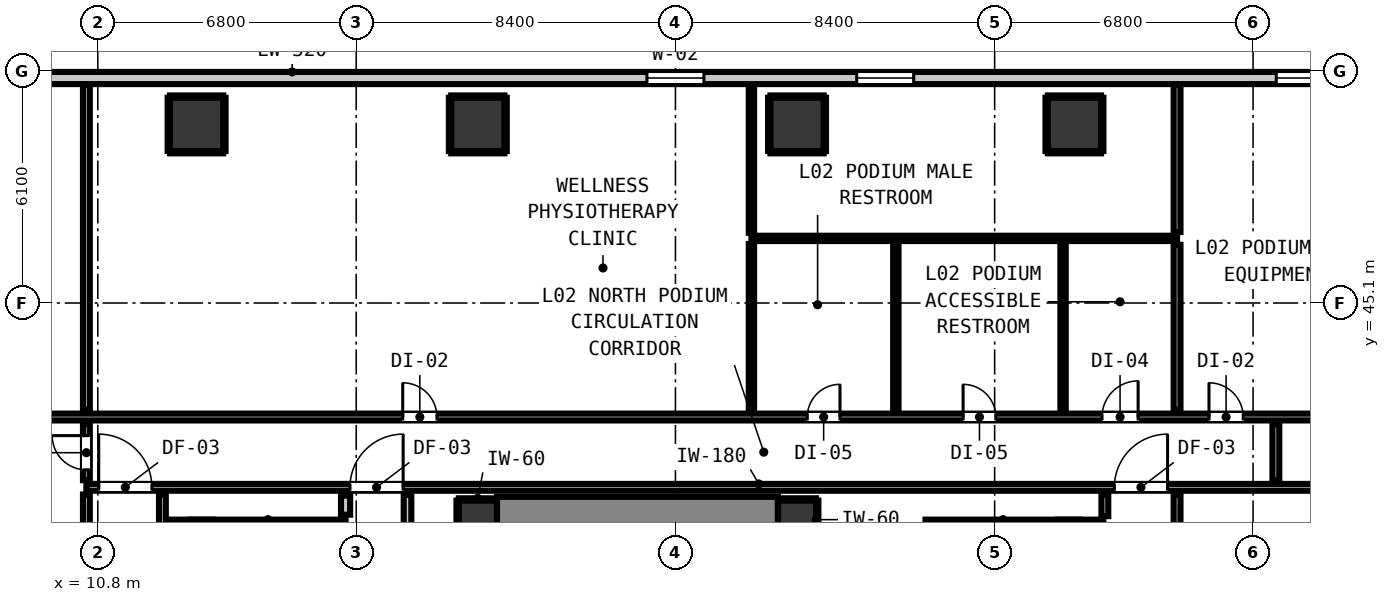
"""IFC4 building model, lengths in metres.
Left out: names, types, materials, properties, quantities, classifications, styles, units other than length and angle.
Written with IfcOpenShell. Run it as: python <this file> out.ifc"""

import sys

from ifc_helpers import new_model, si_unit, direction, frame, frame_2d, origin, origin_2d, place, context, subcontext, project, spatial, rectangle, extrude, element, fill, save


model = new_model("IFC4")
c1 = context("Model", 3, precision=1e-05, world=origin(), true_north=direction((0.0, 1.0)))
c2 = subcontext(c1, "Body", "Model", "MODEL_VIEW")
j1 = project(units=[si_unit("LENGTHUNIT", "METRE"), si_unit("PLANEANGLEUNIT", "RADIAN")], contexts=[c1])
p1 = place(None, origin())
s1 = spatial("IfcSite", under=j1, at=p1, CompositionType="ELEMENT")
p2 = place(p1, origin())
s2 = spatial("IfcBuilding", under=s1, at=p2, CompositionType="ELEMENT")
p3 = place(p2, frame((0.0, 0.0, 9.4)))
s3 = spatial("IfcBuildingStorey", under=s2, at=p3, CompositionType="ELEMENT", Elevation=9.4)
for number, where, z_axis, x_axis in (
    (1, (20.8, 39.4, 0.0), (0.0, 0.0, 1.0), (1.0, 0.0, 0.0)),
    (2, (29.2, 39.4, 0.0), (0.0, 0.0, 1.0), (1.0, 0.0, 0.0)),
):
    element("IfcColumn", number, at=place(p3, frame(where, z_axis=z_axis, x_axis=x_axis)), inside=s3, PredefinedType="COLUMN", context=c2, shape_type="SweptSolid", body=[
        extrude(rectangle(XDim=1.0, YDim=1.0, at=origin_2d()), origin(), (0.0, 0.0, 1.0), 4.2),
    ])
p4 = place(p3, frame((13.24, 31.205, 0.0), z_axis=(0.0, 0.0, 1.0), x_axis=(0.0, 1.0, 0.0)))
e3 = element("IfcWall", 3, at=p4, inside=s3, PredefinedType="SHEAR", context=c2, shape_type="SweptSolid", body=[
    extrude(rectangle(XDim=8.195, YDim=1.2, at=frame_2d((4.097, 0.0))), origin(), (0.0, 0.0, 1.0), 4.2),
])
p5 = place(p3, frame((13.24, 39.1, 0.0), z_axis=(0.0, 0.0, 1.0), x_axis=(1.0, 0.0, 0.0)))
e4 = element("IfcWall", 4, at=p5, inside=s3, PredefinedType="SHEAR", context=c2, shape_type="SweptSolid", body=[
    extrude(rectangle(XDim=4.08, YDim=0.6, at=frame_2d((2.04, 0.0))), origin(), (0.0, 0.0, 1.0), 4.2),
])
p6 = place(p3, frame((36.66, 31.205, 0.0), z_axis=(0.0, 0.0, 1.0), x_axis=(0.0, 1.0, 0.0)))
e5 = element("IfcWall", 5, at=p6, inside=s3, PredefinedType="SHEAR", context=c2, shape_type="SweptSolid", body=[
    extrude(rectangle(XDim=8.195, YDim=1.2, at=frame_2d((4.097, 0.0))), origin(), (0.0, 0.0, 1.0), 4.2),
])
p7 = place(p3, frame((32.58, 39.1, 0.0), z_axis=(0.0, 0.0, 1.0), x_axis=(1.0, 0.0, 0.0)))
e6 = element("IfcWall", 6, at=p7, inside=s3, PredefinedType="SHEAR", context=c2, shape_type="SweptSolid", body=[
    extrude(rectangle(XDim=4.08, YDim=0.6, at=frame_2d((2.04, 0.0))), origin(), (0.0, 0.0, 1.0), 4.2),
])
p8 = place(p3, frame((21.305, 39.4, 0.0), z_axis=(0.0, 0.0, 1.0), x_axis=(1.0, 0.0, 0.0)))
e7 = element("IfcWall", 7, at=p8, inside=s3, PredefinedType="SHEAR", context=c2, shape_type="SweptSolid", body=[
    extrude(rectangle(XDim=7.39, YDim=1.2, at=frame_2d((3.695, 0.0))), origin(), (0.0, 0.0, 1.0), 4.2),
])
for number, where, z_axis, x_axis in (
    (8, (13.4, 49.8, 0.0), (0.0, 0.0, 1.0), (1.0, 0.0, 0.0)),
    (9, (20.8, 49.8, 0.0), (0.0, 0.0, 1.0), (1.0, 0.0, 0.0)),
    (10, (29.2, 49.8, 0.0), (0.0, 0.0, 1.0), (1.0, 0.0, 0.0)),
    (11, (36.5, 49.8, 0.0), (0.0, 0.0, 1.0), (1.0, 0.0, 0.0)),
):
    element("IfcColumn", number, at=place(p3, frame(where, z_axis=z_axis, x_axis=x_axis)), inside=s3, PredefinedType="COLUMN", context=c2, shape_type="SweptSolid", body=[
        extrude(rectangle(XDim=1.4, YDim=1.4, at=origin_2d()), origin(), (0.0, 0.0, 1.0), 4.2),
    ])
p9 = place(p3, frame((6.68, 51.02, 0.0), z_axis=(0.0, 0.0, 1.0), x_axis=(1.0, 0.0, 0.0)))
e12 = element("IfcWall", 12, at=p9, inside=s3, PredefinedType="STANDARD", context=c2, shape_type="SweptSolid", body=[
    extrude(rectangle(XDim=38.64, YDim=0.32, at=frame_2d((19.32, 0.0))), origin(), (0.0, 0.0, 1.0), 3.92),
])
p10 = place(p9, frame((18.57, 0.0, 0.9)))
e13 = element("IfcOpeningElement", 13, at=p10, cuts=e12, PredefinedType="OPENING", context=c2, shape_type="SweptSolid", body=[
    extrude(rectangle(XDim=1.5, YDim=1.8, at=frame_2d((0.75, 0.9))), frame((0.0, 0.17, 0.0), z_axis=(0.0, -1.0, 0.0), x_axis=(1.0, 0.0, 0.0)), (0.0, 0.0, 1.0), 0.34),
])
p11 = place(p9, frame((24.09, 0.0, 0.9)))
e14 = element("IfcOpeningElement", 14, at=p11, cuts=e12, PredefinedType="OPENING", context=c2, shape_type="SweptSolid", body=[
    extrude(rectangle(XDim=1.5, YDim=1.8, at=frame_2d((0.75, 0.9))), frame((0.0, 0.17, 0.0), z_axis=(0.0, -1.0, 0.0), x_axis=(1.0, 0.0, 0.0)), (0.0, 0.0, 1.0), 0.34),
])
p12 = place(p9, frame((35.13, 0.0, 0.9)))
e15 = element("IfcOpeningElement", 15, at=p12, cuts=e12, PredefinedType="OPENING", context=c2, shape_type="SweptSolid", body=[
    extrude(rectangle(XDim=1.5, YDim=1.8, at=frame_2d((0.75, 0.9))), frame((0.0, 0.17, 0.0), z_axis=(0.0, -1.0, 0.0), x_axis=(1.0, 0.0, 0.0)), (0.0, 0.0, 1.0), 0.34),
])
p13 = place(p3, frame((10.5, 40.25, 0.0), z_axis=(0.0, 0.0, 1.0), x_axis=(1.0, 0.0, 0.0)))
e16 = element("IfcWall", 16, at=p13, inside=s3, PredefinedType="PARTITIONING", context=c2, shape_type="SweptSolid", body=[
    extrude(rectangle(XDim=37.148, YDim=0.18, at=frame_2d((18.574, 0.0))), origin(), (0.0, 0.0, 1.0), 3.92),
])
p14 = place(p13, frame((6.935, 0.0, 0.0)))
e17 = element("IfcOpeningElement", 17, at=p14, cuts=e16, PredefinedType="OPENING", context=c2, shape_type="SweptSolid", body=[
    extrude(rectangle(XDim=1.4, YDim=2.15, at=frame_2d((0.7, 1.075))), frame((0.0, 0.1, 0.0), z_axis=(0.0, -1.0, 0.0), x_axis=(1.0, 0.0, 0.0)), (0.0, 0.0, 1.0), 0.2),
])
p15 = place(p13, frame((0.324, 0.0, 0.0)))
e18 = element("IfcOpeningElement", 18, at=p15, cuts=e16, PredefinedType="OPENING", context=c2, shape_type="SweptSolid", body=[
    extrude(rectangle(XDim=1.4, YDim=2.15, at=frame_2d((0.7, 1.075))), frame((0.0, 0.1, 0.0), z_axis=(0.0, -1.0, 0.0), x_axis=(1.0, 0.0, 0.0)), (0.0, 0.0, 1.0), 0.2),
])
p16 = place(p13, frame((27.05, 0.0, 0.0)))
e19 = element("IfcOpeningElement", 19, at=p16, cuts=e16, PredefinedType="OPENING", context=c2, shape_type="SweptSolid", body=[
    extrude(rectangle(XDim=1.4, YDim=2.15, at=frame_2d((0.7, 1.075))), frame((0.0, 0.1, 0.0), z_axis=(0.0, -1.0, 0.0), x_axis=(1.0, 0.0, 0.0)), (0.0, 0.0, 1.0), 0.2),
])
p17 = place(p3, frame((4.352, 42.1, 0.0), z_axis=(0.0, 0.0, 1.0), x_axis=(1.0, 0.0, 0.0)))
e20 = element("IfcWall", 20, at=p17, inside=s3, PredefinedType="PARTITIONING", context=c2, shape_type="SweptSolid", body=[
    extrude(rectangle(XDim=43.296, YDim=0.18, at=frame_2d((21.648, 0.0))), origin(), (0.0, 0.0, 1.0), 3.92),
])
p18 = place(p17, frame((14.472, 0.0, 0.0)))
e21 = element("IfcOpeningElement", 21, at=p18, cuts=e20, PredefinedType="OPENING", context=c2, shape_type="SweptSolid", body=[
    extrude(rectangle(XDim=0.9, YDim=2.1, at=frame_2d((0.45, 1.05))), frame((0.0, 0.1, 0.0), z_axis=(0.0, -1.0, 0.0), x_axis=(1.0, 0.0, 0.0)), (0.0, 0.0, 1.0), 0.2),
])
p19 = place(p17, frame((25.118, 0.0, 0.0)))
e22 = element("IfcOpeningElement", 22, at=p19, cuts=e20, PredefinedType="OPENING", context=c2, shape_type="SweptSolid", body=[
    extrude(rectangle(XDim=0.86, YDim=2.02, at=frame_2d((0.43, 1.01))), frame((0.0, 0.1, 0.0), z_axis=(0.0, -1.0, 0.0), x_axis=(1.0, 0.0, 0.0)), (0.0, 0.0, 1.0), 0.2),
])
p20 = place(p17, frame((29.218, 0.0, 0.0)))
e23 = element("IfcOpeningElement", 23, at=p20, cuts=e20, PredefinedType="OPENING", context=c2, shape_type="SweptSolid", body=[
    extrude(rectangle(XDim=0.86, YDim=2.02, at=frame_2d((0.43, 1.01))), frame((0.0, 0.1, 0.0), z_axis=(0.0, -1.0, 0.0), x_axis=(1.0, 0.0, 0.0)), (0.0, 0.0, 1.0), 0.2),
])
p21 = place(p17, frame((32.873, 0.0, 0.0)))
e24 = element("IfcOpeningElement", 24, at=p21, cuts=e20, PredefinedType="OPENING", context=c2, shape_type="SweptSolid", body=[
    extrude(rectangle(XDim=0.95, YDim=2.1, at=frame_2d((0.475, 1.05))), frame((0.0, 0.1, 0.0), z_axis=(0.0, -1.0, 0.0), x_axis=(1.0, 0.0, 0.0)), (0.0, 0.0, 1.0), 0.2),
])
p22 = place(p17, frame((35.688, 0.0, 0.0)))
e25 = element("IfcOpeningElement", 25, at=p22, cuts=e20, PredefinedType="OPENING", context=c2, shape_type="SweptSolid", body=[
    extrude(rectangle(XDim=0.9, YDim=2.1, at=frame_2d((0.45, 1.05))), frame((0.0, 0.1, 0.0), z_axis=(0.0, -1.0, 0.0), x_axis=(1.0, 0.0, 0.0)), (0.0, 0.0, 1.0), 0.2),
])
p23 = place(p3, frame((28.0, 46.8, 0.0), z_axis=(0.0, 0.0, 1.0), x_axis=(1.0, 0.0, 0.0)))
e26 = element("IfcWall", 26, at=p23, inside=s3, PredefinedType="PARTITIONING", context=c2, shape_type="SweptSolid", body=[
    extrude(rectangle(XDim=11.2, YDim=0.14, at=frame_2d((5.6, 0.0))), origin(), (0.0, 0.0, 1.0), 3.92),
])
p24 = place(p3, frame((17.32, 39.53, 0.0), z_axis=(0.0, 0.0, 1.0), x_axis=(0.0, 1.0, 0.0)))
e27 = element("IfcWall", 27, at=p24, inside=s3, PredefinedType="PARTITIONING", context=c2, shape_type="SweptSolid", body=[
    extrude(rectangle(XDim=0.502, YDim=0.24, at=frame_2d((0.251, 0.0))), origin(), (0.0, 0.0, 1.0), 3.92),
])
p25 = place(p3, frame((18.95, 38.928, 0.0), z_axis=(0.0, 0.0, 1.0), x_axis=(0.0, 1.0, 0.0)))
e28 = element("IfcWall", 28, at=p25, inside=s3, PredefinedType="PARTITIONING", context=c2, shape_type="SweptSolid", body=[
    extrude(rectangle(XDim=1.124, YDim=0.2, at=frame_2d((0.562, 0.0))), origin(), (0.0, 0.0, 1.0), 3.92),
])
p26 = place(p3, frame((10.5, 30.958, 0.0), z_axis=(0.0, 0.0, 1.0), x_axis=(0.0, 1.0, 0.0)))
e29 = element("IfcWall", 29, at=p26, inside=s3, PredefinedType="PARTITIONING", context=c2, shape_type="SweptSolid", body=[
    extrude(rectangle(XDim=9.104, YDim=0.18, at=frame_2d((4.552, 0.0))), origin(), (0.0, 0.0, 1.0), 3.92),
])
p27 = place(p3, frame((10.5, 40.438, 0.0), z_axis=(0.0, 0.0, 1.0), x_axis=(0.0, 1.0, 0.0)))
e30 = element("IfcWall", 30, at=p27, inside=s3, PredefinedType="PARTITIONING", context=c2, shape_type="SweptSolid", body=[
    extrude(rectangle(XDim=1.474, YDim=0.18, at=frame_2d((0.737, 0.0))), origin(), (0.0, 0.0, 1.0), 3.92),
])
p28 = place(p27, frame((0.273, 0.0, 0.0)))
e31 = element("IfcOpeningElement", 31, at=p28, cuts=e30, PredefinedType="OPENING", context=c2, shape_type="SweptSolid", body=[
    extrude(rectangle(XDim=0.9, YDim=2.1, at=frame_2d((0.45, 1.05))), frame((0.0, 0.1, 0.0), z_axis=(0.0, -1.0, 0.0), x_axis=(1.0, 0.0, 0.0)), (0.0, 0.0, 1.0), 0.2),
])
p29 = place(p3, frame((10.5, 42.288, 0.0), z_axis=(0.0, 0.0, 1.0), x_axis=(0.0, 1.0, 0.0)))
e32 = element("IfcWall", 32, at=p29, inside=s3, PredefinedType="PARTITIONING", context=c2, shape_type="SweptSolid", body=[
    extrude(rectangle(XDim=8.56, YDim=0.18, at=frame_2d((4.28, 0.0))), origin(), (0.0, 0.0, 1.0), 3.92),
])
p30 = place(p3, frame((12.5, 21.368, 0.0), z_axis=(0.0, 0.0, 1.0), x_axis=(0.0, 1.0, 0.0)))
e33 = element("IfcWall", 33, at=p30, inside=s3, PredefinedType="PARTITIONING", context=c2, shape_type="SweptSolid", body=[
    extrude(rectangle(XDim=18.694, YDim=0.18, at=frame_2d((9.347, 0.0))), origin(), (0.0, 0.0, 1.0), 3.92),
])
p31 = place(p3, frame((37.3, 39.492, 0.0), z_axis=(0.0, 0.0, 1.0), x_axis=(0.0, 1.0, 0.0)))
e34 = element("IfcWall", 34, at=p31, inside=s3, PredefinedType="PARTITIONING", context=c2, shape_type="SweptSolid", body=[
    extrude(rectangle(XDim=0.57, YDim=0.18, at=frame_2d((0.285, 0.0))), origin(), (0.0, 0.0, 1.0), 3.92),
])
p32 = place(p3, frame((39.2, 21.368, 0.0), z_axis=(0.0, 0.0, 1.0), x_axis=(0.0, 1.0, 0.0)))
e35 = element("IfcWall", 35, at=p32, inside=s3, PredefinedType="PARTITIONING", context=c2, shape_type="SweptSolid", body=[
    extrude(rectangle(XDim=18.694, YDim=0.18, at=frame_2d((9.347, 0.0))), origin(), (0.0, 0.0, 1.0), 3.92),
])
p33 = place(p3, frame((39.2, 42.288, 0.0), z_axis=(0.0, 0.0, 1.0), x_axis=(0.0, 1.0, 0.0)))
e36 = element("IfcWall", 36, at=p33, inside=s3, PredefinedType="PARTITIONING", context=c2, shape_type="SweptSolid", body=[
    extrude(rectangle(XDim=4.344, YDim=0.18, at=frame_2d((2.172, 0.0))), origin(), (0.0, 0.0, 1.0), 3.92),
])
p34 = place(p3, frame((39.2, 46.968, 0.0), z_axis=(0.0, 0.0, 1.0), x_axis=(0.0, 1.0, 0.0)))
e37 = element("IfcWall", 37, at=p34, inside=s3, PredefinedType="PARTITIONING", context=c2, shape_type="SweptSolid", body=[
    extrude(rectangle(XDim=3.88, YDim=0.18, at=frame_2d((1.94, 0.0))), origin(), (0.0, 0.0, 1.0), 3.92),
])
p35 = place(p3, frame((41.8, 40.438, 0.0), z_axis=(0.0, 0.0, 1.0), x_axis=(0.0, 1.0, 0.0)))
e38 = element("IfcWall", 38, at=p35, inside=s3, PredefinedType="PARTITIONING", context=c2, shape_type="SweptSolid", body=[
    extrude(rectangle(XDim=1.474, YDim=0.18, at=frame_2d((0.737, 0.0))), origin(), (0.0, 0.0, 1.0), 3.92),
])
p36 = place(p3, frame((28.0, 42.268, 0.0), z_axis=(0.0, 0.0, 1.0), x_axis=(0.0, 1.0, 0.0)))
e39 = element("IfcWall", 39, at=p36, inside=s3, PredefinedType="PARTITIONING", context=c2, shape_type="SweptSolid", body=[
    extrude(rectangle(XDim=4.384, YDim=0.14, at=frame_2d((2.192, 0.0))), origin(), (0.0, 0.0, 1.0), 3.92),
])
p37 = place(p3, frame((28.0, 46.948, 0.0), z_axis=(0.0, 0.0, 1.0), x_axis=(0.0, 1.0, 0.0)))
e40 = element("IfcWall", 40, at=p37, inside=s3, PredefinedType="PARTITIONING", context=c2, shape_type="SweptSolid", body=[
    extrude(rectangle(XDim=3.9, YDim=0.14, at=frame_2d((1.95, 0.0))), origin(), (0.0, 0.0, 1.0), 3.92),
])
for number, where, z_axis, x_axis in (
    (41, (31.8, 42.268, 0.0), (0.0, 0.0, 1.0), (0.0, 1.0, 0.0)),
    (42, (36.2, 42.268, 0.0), (0.0, 0.0, 1.0), (0.0, 1.0, 0.0)),
):
    element("IfcWall", number, at=place(p3, frame(where, z_axis=z_axis, x_axis=x_axis)), inside=s3, PredefinedType="PARTITIONING", context=c2, shape_type="SweptSolid", body=[
        extrude(rectangle(XDim=4.384, YDim=0.14, at=frame_2d((2.192, 0.0))), origin(), (0.0, 0.0, 1.0), 3.92),
    ])
p38 = place(p3, frame((20.3, 39.932, 0.0), z_axis=(0.0, 0.0, 1.0), x_axis=(1.0, 0.0, 0.0)))
e43 = element("IfcWall", 43, at=p38, inside=s3, PredefinedType="PARTITIONING", context=c2, shape_type="SweptSolid", body=[
    extrude(rectangle(XDim=0.99, YDim=0.06, at=frame_2d((0.495, 0.0))), origin(), (0.0, 0.0, 1.0), 1.45),
])
p39 = place(p3, frame((20.268, 38.9, 0.0), z_axis=(0.0, 0.0, 1.0), x_axis=(0.0, 1.0, 0.0)))
e44 = element("IfcWall", 44, at=p39, inside=s3, PredefinedType="PARTITIONING", context=c2, shape_type="SweptSolid", body=[
    extrude(rectangle(XDim=1.0, YDim=0.06, at=frame_2d((0.5, 0.0))), origin(), (0.0, 0.0, 1.0), 1.45),
])
p40 = place(p3, frame((28.71, 39.932, 0.0), z_axis=(0.0, 0.0, 1.0), x_axis=(1.0, 0.0, 0.0)))
e45 = element("IfcWall", 45, at=p40, inside=s3, PredefinedType="PARTITIONING", context=c2, shape_type="SweptSolid", body=[
    extrude(rectangle(XDim=0.99, YDim=0.06, at=frame_2d((0.495, 0.0))), origin(), (0.0, 0.0, 1.0), 1.45),
])
p41 = place(p3, frame((29.732, 38.9, 0.0), z_axis=(0.0, 0.0, 1.0), x_axis=(0.0, 1.0, 0.0)))
e46 = element("IfcWall", 46, at=p41, inside=s3, PredefinedType="PARTITIONING", context=c2, shape_type="SweptSolid", body=[
    extrude(rectangle(XDim=1.0, YDim=0.06, at=frame_2d((0.5, 0.0))), origin(), (0.0, 0.0, 1.0), 1.45),
])
for number, where, z_axis, x_axis in (
    (47, (12.7, 49.068, 0.0), (0.0, 0.0, 1.0), (1.0, 0.0, 0.0)),
    (48, (12.7, 50.532, 0.0), (0.0, 0.0, 1.0), (1.0, 0.0, 0.0)),
):
    element("IfcWall", number, at=place(p3, frame(where, z_axis=z_axis, x_axis=x_axis)), inside=s3, PredefinedType="PARTITIONING", context=c2, shape_type="SweptSolid", body=[
        extrude(rectangle(XDim=1.4, YDim=0.06, at=frame_2d((0.7, 0.0))), origin(), (0.0, 0.0, 1.0), 1.45),
    ])
for number, where, z_axis, x_axis in (
    (49, (12.668, 49.1, 0.0), (0.0, 0.0, 1.0), (0.0, 1.0, 0.0)),
    (50, (14.132, 49.1, 0.0), (0.0, 0.0, 1.0), (0.0, 1.0, 0.0)),
    (51, (20.1, 49.068, 0.0), (0.0, 0.0, 1.0), (1.0, 0.0, 0.0)),
    (52, (20.1, 50.532, 0.0), (0.0, 0.0, 1.0), (1.0, 0.0, 0.0)),
    (53, (20.068, 49.1, 0.0), (0.0, 0.0, 1.0), (0.0, 1.0, 0.0)),
    (54, (21.532, 49.1, 0.0), (0.0, 0.0, 1.0), (0.0, 1.0, 0.0)),
    (55, (28.5, 49.068, 0.0), (0.0, 0.0, 1.0), (1.0, 0.0, 0.0)),
    (56, (28.5, 50.532, 0.0), (0.0, 0.0, 1.0), (1.0, 0.0, 0.0)),
    (57, (28.468, 49.1, 0.0), (0.0, 0.0, 1.0), (0.0, 1.0, 0.0)),
    (58, (29.932, 49.1, 0.0), (0.0, 0.0, 1.0), (0.0, 1.0, 0.0)),
    (59, (35.8, 49.068, 0.0), (0.0, 0.0, 1.0), (1.0, 0.0, 0.0)),
    (60, (35.8, 50.532, 0.0), (0.0, 0.0, 1.0), (1.0, 0.0, 0.0)),
    (61, (35.768, 49.1, 0.0), (0.0, 0.0, 1.0), (0.0, 1.0, 0.0)),
    (62, (37.232, 49.1, 0.0), (0.0, 0.0, 1.0), (0.0, 1.0, 0.0)),
):
    element("IfcWall", number, at=place(p3, frame(where, z_axis=z_axis, x_axis=x_axis)), inside=s3, PredefinedType="PARTITIONING", context=c2, shape_type="SweptSolid", body=[
        extrude(rectangle(XDim=1.4, YDim=0.06, at=frame_2d((0.7, 0.0))), origin(), (0.0, 0.0, 1.0), 1.45),
    ])
p42 = place(p10, origin())
e63 = element("IfcWindow", 63, at=p42, inside=s3, PartitioningType="SINGLE_PANEL", PredefinedType="WINDOW", context=c2, shape_type="SweptSolid", body=[
    extrude(rectangle(XDim=1.5, YDim=1.8, at=frame_2d((0.75, 0.9))), frame((0.0, 0.03, 0.0), z_axis=(0.0, -1.0, 0.0), x_axis=(1.0, 0.0, 0.0)), (0.0, 0.0, 1.0), 0.06),
])
fill(e13, e63)
p43 = place(p11, origin())
e64 = element("IfcWindow", 64, at=p43, inside=s3, PartitioningType="SINGLE_PANEL", PredefinedType="WINDOW", context=c2, shape_type="SweptSolid", body=[
    extrude(rectangle(XDim=1.5, YDim=1.8, at=frame_2d((0.75, 0.9))), frame((0.0, 0.03, 0.0), z_axis=(0.0, -1.0, 0.0), x_axis=(1.0, 0.0, 0.0)), (0.0, 0.0, 1.0), 0.06),
])
fill(e14, e64)
p44 = place(p12, origin())
e65 = element("IfcWindow", 65, at=p44, inside=s3, PartitioningType="SINGLE_PANEL", PredefinedType="WINDOW", context=c2, shape_type="SweptSolid", body=[
    extrude(rectangle(XDim=1.5, YDim=1.8, at=frame_2d((0.75, 0.9))), frame((0.0, 0.03, 0.0), z_axis=(0.0, -1.0, 0.0), x_axis=(1.0, 0.0, 0.0)), (0.0, 0.0, 1.0), 0.06),
])
fill(e15, e65)
p45 = place(p14, origin())
e66 = element("IfcDoor", 66, at=p45, inside=s3, OperationType="SINGLE_SWING_RIGHT", PredefinedType="DOOR", context=c2, shape_type="SweptSolid", body=[
    extrude(rectangle(XDim=1.4, YDim=2.15, at=frame_2d((0.7, 1.075))), frame((0.0, 0.025, 0.0), z_axis=(0.0, -1.0, 0.0), x_axis=(1.0, 0.0, 0.0)), (0.0, 0.0, 1.0), 0.05),
])
fill(e17, e66)
p46 = place(p15, origin())
e67 = element("IfcDoor", 67, at=p46, inside=s3, OperationType="SINGLE_SWING_LEFT", PredefinedType="DOOR", context=c2, shape_type="SweptSolid", body=[
    extrude(rectangle(XDim=1.4, YDim=2.15, at=frame_2d((0.7, 1.075))), frame((0.0, 0.025, 0.0), z_axis=(0.0, -1.0, 0.0), x_axis=(1.0, 0.0, 0.0)), (0.0, 0.0, 1.0), 0.05),
])
fill(e18, e67)
p47 = place(p16, origin())
e68 = element("IfcDoor", 68, at=p47, inside=s3, OperationType="SINGLE_SWING_RIGHT", PredefinedType="DOOR", context=c2, shape_type="SweptSolid", body=[
    extrude(rectangle(XDim=1.4, YDim=2.15, at=frame_2d((0.7, 1.075))), frame((0.0, 0.025, 0.0), z_axis=(0.0, -1.0, 0.0), x_axis=(1.0, 0.0, 0.0)), (0.0, 0.0, 1.0), 0.05),
])
fill(e19, e68)
p48 = place(p28, origin())
e69 = element("IfcDoor", 69, at=p48, inside=s3, OperationType="SINGLE_SWING_RIGHT", PredefinedType="DOOR", context=c2, shape_type="SweptSolid", body=[
    extrude(rectangle(XDim=0.9, YDim=2.1, at=frame_2d((0.45, 1.05))), frame((0.0, 0.025, 0.0), z_axis=(0.0, -1.0, 0.0), x_axis=(1.0, 0.0, 0.0)), (0.0, 0.0, 1.0), 0.05),
])
fill(e31, e69)
p49 = place(p18, origin())
e70 = element("IfcDoor", 70, at=p49, inside=s3, OperationType="SINGLE_SWING_LEFT", PredefinedType="DOOR", context=c2, shape_type="SweptSolid", body=[
    extrude(rectangle(XDim=0.9, YDim=2.1, at=frame_2d((0.45, 1.05))), frame((0.0, 0.025, 0.0), z_axis=(0.0, -1.0, 0.0), x_axis=(1.0, 0.0, 0.0)), (0.0, 0.0, 1.0), 0.05),
])
fill(e21, e70)
p50 = place(p19, origin())
e71 = element("IfcDoor", 71, at=p50, inside=s3, OperationType="SINGLE_SWING_RIGHT", PredefinedType="DOOR", context=c2, shape_type="SweptSolid", body=[
    extrude(rectangle(XDim=0.86, YDim=2.02, at=frame_2d((0.43, 1.01))), frame((0.0, 0.025, 0.0), z_axis=(0.0, -1.0, 0.0), x_axis=(1.0, 0.0, 0.0)), (0.0, 0.0, 1.0), 0.05),
])
fill(e22, e71)
p51 = place(p20, origin())
e72 = element("IfcDoor", 72, at=p51, inside=s3, OperationType="SINGLE_SWING_LEFT", PredefinedType="DOOR", context=c2, shape_type="SweptSolid", body=[
    extrude(rectangle(XDim=0.86, YDim=2.02, at=frame_2d((0.43, 1.01))), frame((0.0, 0.025, 0.0), z_axis=(0.0, -1.0, 0.0), x_axis=(1.0, 0.0, 0.0)), (0.0, 0.0, 1.0), 0.05),
])
fill(e23, e72)
p52 = place(p21, origin())
e73 = element("IfcDoor", 73, at=p52, inside=s3, OperationType="SINGLE_SWING_RIGHT", PredefinedType="DOOR", context=c2, shape_type="SweptSolid", body=[
    extrude(rectangle(XDim=0.95, YDim=2.1, at=frame_2d((0.475, 1.05))), frame((0.0, 0.025, 0.0), z_axis=(0.0, -1.0, 0.0), x_axis=(1.0, 0.0, 0.0)), (0.0, 0.0, 1.0), 0.05),
])
fill(e24, e73)
p53 = place(p22, origin())
e74 = element("IfcDoor", 74, at=p53, inside=s3, OperationType="SINGLE_SWING_LEFT", PredefinedType="DOOR", context=c2, shape_type="SweptSolid", body=[
    extrude(rectangle(XDim=0.9, YDim=2.1, at=frame_2d((0.45, 1.05))), frame((0.0, 0.025, 0.0), z_axis=(0.0, -1.0, 0.0), x_axis=(1.0, 0.0, 0.0)), (0.0, 0.0, 1.0), 0.05),
])
fill(e25, e74)
save(model, sys.argv[1])
